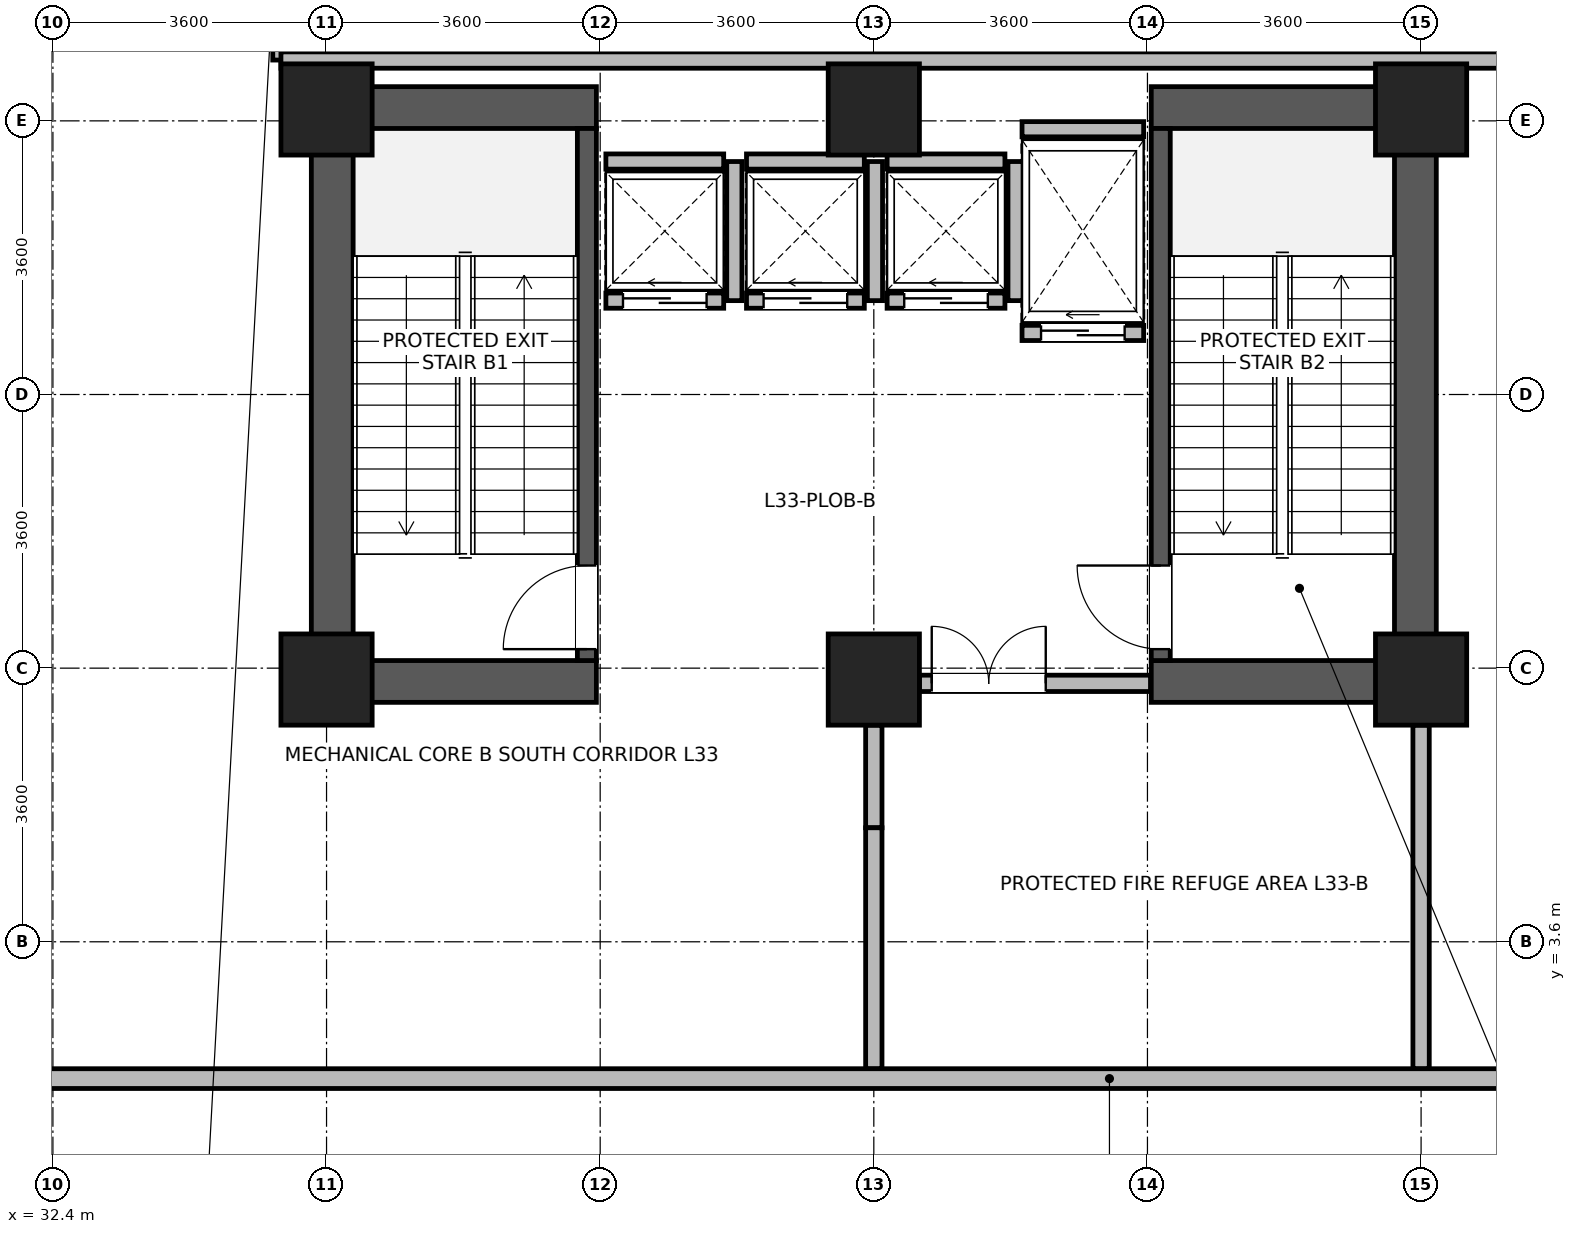
"""IFC4 building model, lengths in metres.
Left out: names, types, materials, properties, quantities, classifications, styles, units other than length and angle.
Written with IfcOpenShell. Run it as: python <this file> out.ifc"""

import sys

from ifc_helpers import new_model, si_unit, direction, frame, frame_2d, origin, origin_2d, place, context, subcontext, project, spatial, rectangle, extrude, source, transform, mapped, element, fill, save


model = new_model("IFC4")
c1 = context("Model", 3, precision=1e-05, world=origin(), true_north=direction((0.0, 1.0)))
c2 = subcontext(c1, "Body", "Model", "MODEL_VIEW")
j1 = project(units=[si_unit("LENGTHUNIT", "METRE"), si_unit("PLANEANGLEUNIT", "RADIAN")], contexts=[c1])
p1 = place(None, origin())
s1 = spatial("IfcSite", under=j1, at=p1, CompositionType="ELEMENT")
p2 = place(p1, origin())
s2 = spatial("IfcBuilding", under=s1, at=p2, CompositionType="ELEMENT")
p3 = place(p2, frame((0.0, 0.0, 130.4)))
s3 = spatial("IfcBuildingStorey", under=s2, at=p3, CompositionType="ELEMENT", Elevation=130.4)
for number, where, z_axis, x_axis in (
    (1, (36.075, 6.75, 0.0), (0.0, 0.0, 1.0), (0.0, 1.0, 0.0)),
    (2, (50.325, 6.75, 0.0), (0.0, 0.0, 1.0), (0.0, 1.0, 0.0)),
):
    element("IfcWall", number, at=place(p3, frame(where, z_axis=z_axis, x_axis=x_axis)), inside=s3, PredefinedType="SHEAR", context=c2, shape_type="SweptSolid", body=[
        extrude(rectangle(XDim=8.1, YDim=0.55, at=frame_2d((4.05, 0.0))), origin(), (0.0, 0.0, 1.0), 4.78),
    ])
for number, where, z_axis, x_axis in (
    (3, (36.35, 7.025, 0.0), (0.0, 0.0, 1.0), (1.0, 0.0, 0.0)),
    (4, (46.85, 7.025, 0.0), (0.0, 0.0, 1.0), (1.0, 0.0, 0.0)),
    (5, (36.35, 14.575, 0.0), (0.0, 0.0, 1.0), (1.0, 0.0, 0.0)),
    (6, (46.85, 14.575, 0.0), (0.0, 0.0, 1.0), (1.0, 0.0, 0.0)),
):
    element("IfcWall", number, at=place(p3, frame(where, z_axis=z_axis, x_axis=x_axis)), inside=s3, PredefinedType="SHEAR", context=c2, shape_type="SweptSolid", body=[
        extrude(rectangle(XDim=3.2, YDim=0.55, at=frame_2d((1.6, 0.0))), origin(), (0.0, 0.0, 1.0), 4.78),
    ])
p4 = place(p3, frame((39.425, 7.3, 0.0), z_axis=(0.0, 0.0, 1.0), x_axis=(0.0, 1.0, 0.0)))
e7 = element("IfcWall", 7, at=p4, inside=s3, PredefinedType="SHEAR", context=c2, shape_type="SweptSolid", body=[
    extrude(rectangle(XDim=7.0, YDim=0.25, at=frame_2d((3.5, 0.0))), origin(), (0.0, 0.0, 1.0), 4.78),
])
p5 = place(p4, frame((0.15, 0.0, 0.0)))
e8 = element("IfcOpeningElement", 8, at=p5, cuts=e7, PredefinedType="OPENING", context=c2, shape_type="SweptSolid", body=[
    extrude(rectangle(XDim=1.1, YDim=2.08, at=frame_2d((0.55, 1.04))), frame((0.0, 0.135, 0.0), z_axis=(0.0, -1.0, 0.0), x_axis=(1.0, 0.0, 0.0)), (0.0, 0.0, 1.0), 0.27),
])
p6 = place(p3, frame((46.975, 7.3, 0.0), z_axis=(0.0, 0.0, 1.0), x_axis=(0.0, 1.0, 0.0)))
e9 = element("IfcWall", 9, at=p6, inside=s3, PredefinedType="SHEAR", context=c2, shape_type="SweptSolid", body=[
    extrude(rectangle(XDim=7.0, YDim=0.25, at=frame_2d((3.5, 0.0))), origin(), (0.0, 0.0, 1.0), 4.78),
])
p7 = place(p6, frame((0.15, 0.0, 0.0)))
e10 = element("IfcOpeningElement", 10, at=p7, cuts=e9, PredefinedType="OPENING", context=c2, shape_type="SweptSolid", body=[
    extrude(rectangle(XDim=1.1, YDim=2.08, at=frame_2d((0.55, 1.04))), frame((0.0, 0.135, 0.0), z_axis=(0.0, -1.0, 0.0), x_axis=(1.0, 0.0, 0.0)), (0.0, 0.0, 1.0), 0.27),
])
m1 = source(origin(), c2, "Body", "SweptSolid", [
    extrude(rectangle(XDim=1.2, YDim=1.2, at=origin_2d()), origin(), (0.0, 0.0, 1.0), 5.2),
])
for number, where, z_axis, x_axis in (
    (11, (36.0, 7.05, 0.0), (0.0, 0.0, 1.0), (1.0, 0.0, 0.0)),
    (12, (36.0, 14.55, 0.0), (0.0, 0.0, 1.0), (1.0, 0.0, 0.0)),
    (13, (43.2, 7.05, 0.0), (0.0, 0.0, 1.0), (1.0, 0.0, 0.0)),
    (14, (43.2, 14.55, 0.0), (0.0, 0.0, 1.0), (1.0, 0.0, 0.0)),
    (15, (50.4, 7.05, 0.0), (0.0, 0.0, 1.0), (1.0, 0.0, 0.0)),
    (16, (50.4, 14.55, 0.0), (0.0, 0.0, 1.0), (1.0, 0.0, 0.0)),
):
    element("IfcColumn", number, at=place(p3, frame(where, z_axis=z_axis, x_axis=x_axis)), inside=s3, PredefinedType="COLUMN", context=c2, shape_type="MappedRepresentation", body=[
        mapped(m1, transform((0.0, 0.0, 0.0), x_axis=(1.0, 0.0, 0.0), y_axis=(0.0, 1.0, 0.0), z_axis=(0.0, 0.0, 1.0), scale=1.0)),
    ])
p8 = place(p3, frame((60.565, 1.8, 0.0), z_axis=(0.0, 0.0, 1.0), x_axis=(-1.0, 0.0, 0.0)))
e17 = element("IfcWall", 17, at=p8, inside=s3, PredefinedType="STANDARD", context=c2, shape_type="SweptSolid", body=[
    extrude(rectangle(XDim=28.53, YDim=0.26, at=frame_2d((14.265, 0.0))), origin(), (0.0, 0.0, 1.0), 4.76),
])
p9 = place(p3, frame((39.675, 12.035, 0.0), z_axis=(0.0, 0.0, 1.0), x_axis=(1.0, 0.0, 0.0)))
e18 = element("IfcWall", 18, at=p9, inside=s3, PredefinedType="PARTITIONING", context=c2, shape_type="SweptSolid", body=[
    extrude(rectangle(XDim=1.55, YDim=0.2, at=frame_2d((0.775, 0.0))), origin(), (0.0, 0.0, 1.0), 4.76),
])
p10 = place(p9, frame((0.225, 0.0, 0.0)))
e19 = element("IfcOpeningElement", 19, at=p10, cuts=e18, PredefinedType="OPENING", context=c2, shape_type="SweptSolid", body=[
    extrude(rectangle(XDim=1.1, YDim=2.12, at=frame_2d((0.55, 1.06))), frame((0.0, 0.11, 0.0), z_axis=(0.0, -1.0, 0.0), x_axis=(1.0, 0.0, 0.0)), (0.0, 0.0, 1.0), 0.22),
])
p11 = place(p3, frame((39.675, 13.865, 0.0), z_axis=(0.0, 0.0, 1.0), x_axis=(1.0, 0.0, 0.0)))
e20 = element("IfcWall", 20, at=p11, inside=s3, PredefinedType="PARTITIONING", context=c2, shape_type="SweptSolid", body=[
    extrude(rectangle(XDim=1.55, YDim=0.2, at=frame_2d((0.775, 0.0))), origin(), (0.0, 0.0, 1.0), 4.76),
])
p12 = place(p3, frame((41.365, 12.035, 0.0), z_axis=(0.0, 0.0, 1.0), x_axis=(0.0, 1.0, 0.0)))
e21 = element("IfcWall", 21, at=p12, inside=s3, PredefinedType="PARTITIONING", context=c2, shape_type="SweptSolid", body=[
    extrude(rectangle(XDim=1.83, YDim=0.2, at=frame_2d((0.915, 0.0))), origin(), (0.0, 0.0, 1.0), 4.76),
])
p13 = place(p3, frame((41.525, 12.035, 0.0), z_axis=(0.0, 0.0, 1.0), x_axis=(1.0, 0.0, 0.0)))
e22 = element("IfcWall", 22, at=p13, inside=s3, PredefinedType="PARTITIONING", context=c2, shape_type="SweptSolid", body=[
    extrude(rectangle(XDim=1.55, YDim=0.2, at=frame_2d((0.775, 0.0))), origin(), (0.0, 0.0, 1.0), 4.76),
])
p14 = place(p13, frame((0.225, 0.0, 0.0)))
e23 = element("IfcOpeningElement", 23, at=p14, cuts=e22, PredefinedType="OPENING", context=c2, shape_type="SweptSolid", body=[
    extrude(rectangle(XDim=1.1, YDim=2.12, at=frame_2d((0.55, 1.06))), frame((0.0, 0.11, 0.0), z_axis=(0.0, -1.0, 0.0), x_axis=(1.0, 0.0, 0.0)), (0.0, 0.0, 1.0), 0.22),
])
p15 = place(p3, frame((41.525, 13.865, 0.0), z_axis=(0.0, 0.0, 1.0), x_axis=(1.0, 0.0, 0.0)))
e24 = element("IfcWall", 24, at=p15, inside=s3, PredefinedType="PARTITIONING", context=c2, shape_type="SweptSolid", body=[
    extrude(rectangle(XDim=1.55, YDim=0.2, at=frame_2d((0.775, 0.0))), origin(), (0.0, 0.0, 1.0), 4.76),
])
p16 = place(p3, frame((43.215, 12.035, 0.0), z_axis=(0.0, 0.0, 1.0), x_axis=(0.0, 1.0, 0.0)))
e25 = element("IfcWall", 25, at=p16, inside=s3, PredefinedType="PARTITIONING", context=c2, shape_type="SweptSolid", body=[
    extrude(rectangle(XDim=1.83, YDim=0.2, at=frame_2d((0.915, 0.0))), origin(), (0.0, 0.0, 1.0), 4.76),
])
p17 = place(p3, frame((43.375, 12.035, 0.0), z_axis=(0.0, 0.0, 1.0), x_axis=(1.0, 0.0, 0.0)))
e26 = element("IfcWall", 26, at=p17, inside=s3, PredefinedType="PARTITIONING", context=c2, shape_type="SweptSolid", body=[
    extrude(rectangle(XDim=1.55, YDim=0.2, at=frame_2d((0.775, 0.0))), origin(), (0.0, 0.0, 1.0), 4.76),
])
p18 = place(p17, frame((0.225, 0.0, 0.0)))
e27 = element("IfcOpeningElement", 27, at=p18, cuts=e26, PredefinedType="OPENING", context=c2, shape_type="SweptSolid", body=[
    extrude(rectangle(XDim=1.1, YDim=2.12, at=frame_2d((0.55, 1.06))), frame((0.0, 0.11, 0.0), z_axis=(0.0, -1.0, 0.0), x_axis=(1.0, 0.0, 0.0)), (0.0, 0.0, 1.0), 0.22),
])
p19 = place(p3, frame((43.375, 13.865, 0.0), z_axis=(0.0, 0.0, 1.0), x_axis=(1.0, 0.0, 0.0)))
e28 = element("IfcWall", 28, at=p19, inside=s3, PredefinedType="PARTITIONING", context=c2, shape_type="SweptSolid", body=[
    extrude(rectangle(XDim=1.55, YDim=0.2, at=frame_2d((0.775, 0.0))), origin(), (0.0, 0.0, 1.0), 4.76),
])
p20 = place(p3, frame((45.065, 12.035, 0.0), z_axis=(0.0, 0.0, 1.0), x_axis=(0.0, 1.0, 0.0)))
e29 = element("IfcWall", 29, at=p20, inside=s3, PredefinedType="PARTITIONING", context=c2, shape_type="SweptSolid", body=[
    extrude(rectangle(XDim=1.83, YDim=0.2, at=frame_2d((0.915, 0.0))), origin(), (0.0, 0.0, 1.0), 4.76),
])
p21 = place(p3, frame((45.15, 11.61, 0.0), z_axis=(0.0, 0.0, 1.0), x_axis=(1.0, 0.0, 0.0)))
e30 = element("IfcWall", 30, at=p21, inside=s3, PredefinedType="PARTITIONING", context=c2, shape_type="SweptSolid", body=[
    extrude(rectangle(XDim=1.6, YDim=0.2, at=frame_2d((0.8, 0.0))), origin(), (0.0, 0.0, 1.0), 4.76),
])
p22 = place(p21, frame((0.25, 0.0, 0.0)))
e31 = element("IfcOpeningElement", 31, at=p22, cuts=e30, PredefinedType="OPENING", context=c2, shape_type="SweptSolid", body=[
    extrude(rectangle(XDim=1.1, YDim=2.12, at=frame_2d((0.55, 1.06))), frame((0.0, 0.11, 0.0), z_axis=(0.0, -1.0, 0.0), x_axis=(1.0, 0.0, 0.0)), (0.0, 0.0, 1.0), 0.22),
])
p23 = place(p3, frame((45.15, 14.29, 0.0), z_axis=(0.0, 0.0, 1.0), x_axis=(1.0, 0.0, 0.0)))
e32 = element("IfcWall", 32, at=p23, inside=s3, PredefinedType="PARTITIONING", context=c2, shape_type="SweptSolid", body=[
    extrude(rectangle(XDim=1.6, YDim=0.2, at=frame_2d((0.8, 0.0))), origin(), (0.0, 0.0, 1.0), 3.76),
])
p24 = place(p3, frame((43.8, 7.0, 0.0), z_axis=(0.0, 0.0, 1.0), x_axis=(1.0, 0.0, 0.0)))
e33 = element("IfcWall", 33, at=p24, inside=s3, PredefinedType="PARTITIONING", context=c2, shape_type="SweptSolid", body=[
    extrude(rectangle(XDim=3.04, YDim=0.215, at=frame_2d((1.52, 0.0))), origin(), (0.0, 0.0, 1.0), 3.76),
])
p25 = place(p24, frame((0.162, 0.0, 0.0)))
e34 = element("IfcOpeningElement", 34, at=p25, cuts=e33, PredefinedType="OPENING", context=c2, shape_type="SweptSolid", body=[
    extrude(rectangle(XDim=1.5, YDim=2.1, at=frame_2d((0.75, 1.05))), frame((0.0, 0.118, 0.0), z_axis=(0.0, -1.0, 0.0), x_axis=(1.0, 0.0, 0.0)), (0.0, 0.0, 1.0), 0.235),
])
p26 = place(p3, frame((35.4, 15.2, 0.0), z_axis=(0.0, 0.0, 1.0), x_axis=(0.0, 1.0, 0.0)))
e35 = element("IfcWall", 35, at=p26, inside=s3, PredefinedType="PARTITIONING", context=c2, shape_type="SweptSolid", body=[
    extrude(rectangle(XDim=5.8, YDim=0.215, at=frame_2d((2.9, 0.0))), origin(), (0.0, 0.0, 1.0), 4.76),
])
p27 = place(p26, frame((2.2, 0.0, 0.0)))
e36 = element("IfcOpeningElement", 36, at=p27, cuts=e35, PredefinedType="OPENING", context=c2, shape_type="SweptSolid", body=[
    extrude(rectangle(XDim=1.4, YDim=2.15, at=frame_2d((0.7, 1.075))), frame((0.0, 0.118, 0.0), z_axis=(0.0, -1.0, 0.0), x_axis=(1.0, 0.0, 0.0)), (0.0, 0.0, 1.0), 0.235),
])
p28 = place(p3, frame((43.2, 5.1, 0.0), z_axis=(0.0, 0.0, 1.0), x_axis=(0.0, 1.0, 0.0)))
e37 = element("IfcWall", 37, at=p28, inside=s3, PredefinedType="PARTITIONING", context=c2, shape_type="SweptSolid", body=[
    extrude(rectangle(XDim=1.35, YDim=0.215, at=frame_2d((0.675, 0.0))), origin(), (0.0, 0.0, 1.0), 4.76),
])
p29 = place(p3, frame((35.4, 15.2, 0.0), z_axis=(0.0, 0.0, 1.0), x_axis=(1.0, 0.0, 0.0)))
e38 = element("IfcWall", 38, at=p29, inside=s3, PredefinedType="PARTITIONING", context=c2, shape_type="SweptSolid", body=[
    extrude(rectangle(XDim=25.168, YDim=0.215, at=frame_2d((12.584, 0.0))), origin(), (0.0, 0.0, 1.0), 4.76),
])
p30 = place(p3, frame((50.4, 1.932, 0.0), z_axis=(0.0, 0.0, 1.0), x_axis=(0.0, 1.0, 0.0)))
e39 = element("IfcWall", 39, at=p30, inside=s3, PredefinedType="PARTITIONING", context=c2, shape_type="SweptSolid", body=[
    extrude(rectangle(XDim=4.518, YDim=0.215, at=frame_2d((2.259, 0.0))), origin(), (0.0, 0.0, 1.0), 4.76),
])
p31 = place(p3, frame((43.2, 1.932, 0.0), z_axis=(0.0, 0.0, 1.0), x_axis=(0.0, 1.0, 0.0)))
e40 = element("IfcWall", 40, at=p31, inside=s3, PredefinedType="PARTITIONING", context=c2, shape_type="SweptSolid", body=[
    extrude(rectangle(XDim=3.168, YDim=0.215, at=frame_2d((1.584, 0.0))), origin(), (0.0, 0.0, 1.0), 4.76),
])
p32 = place(p5, origin())
e41 = element("IfcDoor", 41, at=p32, inside=s3, OperationType="SINGLE_SWING_LEFT", PredefinedType="DOOR", context=c2, shape_type="SweptSolid", body=[
    extrude(rectangle(XDim=1.1, YDim=2.08, at=frame_2d((0.55, 1.04))), frame((0.0, 0.025, 0.0), z_axis=(0.0, -1.0, 0.0), x_axis=(1.0, 0.0, 0.0)), (0.0, 0.0, 1.0), 0.05),
])
fill(e8, e41)
p33 = place(p7, origin())
e42 = element("IfcDoor", 42, at=p33, inside=s3, OperationType="SINGLE_SWING_RIGHT", PredefinedType="DOOR", context=c2, shape_type="SweptSolid", body=[
    extrude(rectangle(XDim=1.1, YDim=2.08, at=frame_2d((0.55, 1.04))), frame((0.0, 0.025, 0.0), z_axis=(0.0, -1.0, 0.0), x_axis=(1.0, 0.0, 0.0)), (0.0, 0.0, 1.0), 0.05),
])
fill(e10, e42)
p34 = place(p10, origin())
e43 = element("IfcDoor", 43, at=p34, inside=s3, OperationType="SLIDING_TO_LEFT", PredefinedType="DOOR", context=c2, shape_type="SweptSolid", body=[
    extrude(rectangle(XDim=1.1, YDim=2.12, at=frame_2d((0.55, 1.06))), frame((0.0, 0.025, 0.0), z_axis=(0.0, -1.0, 0.0), x_axis=(1.0, 0.0, 0.0)), (0.0, 0.0, 1.0), 0.05),
])
fill(e19, e43)
p35 = place(p14, origin())
e44 = element("IfcDoor", 44, at=p35, inside=s3, OperationType="SLIDING_TO_LEFT", PredefinedType="DOOR", context=c2, shape_type="SweptSolid", body=[
    extrude(rectangle(XDim=1.1, YDim=2.12, at=frame_2d((0.55, 1.06))), frame((0.0, 0.025, 0.0), z_axis=(0.0, -1.0, 0.0), x_axis=(1.0, 0.0, 0.0)), (0.0, 0.0, 1.0), 0.05),
])
fill(e23, e44)
p36 = place(p18, origin())
e45 = element("IfcDoor", 45, at=p36, inside=s3, OperationType="SLIDING_TO_LEFT", PredefinedType="DOOR", context=c2, shape_type="SweptSolid", body=[
    extrude(rectangle(XDim=1.1, YDim=2.12, at=frame_2d((0.55, 1.06))), frame((0.0, 0.025, 0.0), z_axis=(0.0, -1.0, 0.0), x_axis=(1.0, 0.0, 0.0)), (0.0, 0.0, 1.0), 0.05),
])
fill(e27, e45)
p37 = place(p22, origin())
e46 = element("IfcDoor", 46, at=p37, inside=s3, OperationType="SLIDING_TO_LEFT", PredefinedType="DOOR", context=c2, shape_type="SweptSolid", body=[
    extrude(rectangle(XDim=1.1, YDim=2.12, at=frame_2d((0.55, 1.06))), frame((0.0, 0.025, 0.0), z_axis=(0.0, -1.0, 0.0), x_axis=(1.0, 0.0, 0.0)), (0.0, 0.0, 1.0), 0.05),
])
fill(e31, e46)
p38 = place(p25, origin())
e47 = element("IfcDoor", 47, at=p38, inside=s3, OperationType="DOUBLE_DOOR_SINGLE_SWING", PredefinedType="DOOR", context=c2, shape_type="SweptSolid", body=[
    extrude(rectangle(XDim=1.5, YDim=2.1, at=frame_2d((0.75, 1.05))), frame((0.0, 0.025, 0.0), z_axis=(0.0, -1.0, 0.0), x_axis=(1.0, 0.0, 0.0)), (0.0, 0.0, 1.0), 0.05),
])
fill(e34, e47)
save(model, sys.argv[1])
